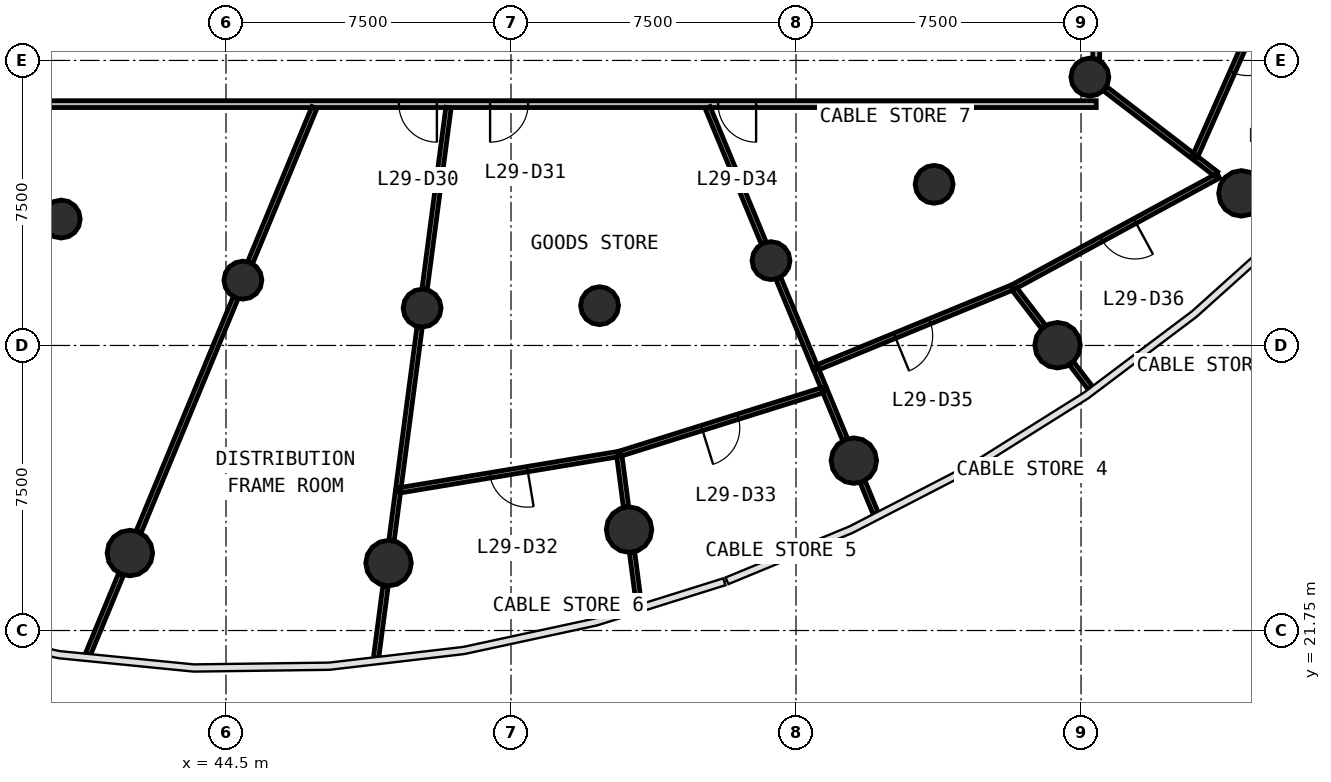
"""IFC4 building model, lengths in metres.
Left out: names, types, materials, properties, quantities, classifications, styles, units other than length and angle.
Written with IfcOpenShell. Run it as: python <this file> out.ifc"""

import sys

from ifc_helpers import new_model, si_unit, direction, frame, frame_2d, origin, origin_2d, place, context, subcontext, project, spatial, rectangle, circle, extrude, source, transform, mapped, element, fill, save


model = new_model("IFC4")
c1 = context("Model", 3, precision=1e-05, world=origin(), true_north=direction((0.0, 1.0)))
c2 = subcontext(c1, "Body", "Model", "MODEL_VIEW")
j1 = project(units=[si_unit("LENGTHUNIT", "METRE"), si_unit("PLANEANGLEUNIT", "RADIAN")], contexts=[c1])
p1 = place(None, origin())
s1 = spatial("IfcSite", under=j1, at=p1, CompositionType="ELEMENT")
p2 = place(p1, origin())
s2 = spatial("IfcBuilding", under=s1, at=p2, CompositionType="ELEMENT")
p3 = place(p2, frame((0.0, 0.0, 124.9)))
s3 = spatial("IfcBuildingStorey", under=s2, at=p3, CompositionType="ELEMENT", Elevation=124.9)
m1 = source(origin(), c2, "Body", "SweptSolid", [
    extrude(circle(Radius=0.6, at=origin_2d()), origin(), (0.0, 0.0, 1.0), 4.1),
])
for number, where, z_axis, x_axis in (
    (1, (41.971, 23.788, 0.0), (0.0, 0.0, 1.0), (1.0, 0.0, 0.0)),
    (2, (48.778, 23.523, 0.0), (0.0, 0.0, 1.0), (1.0, 0.0, 0.0)),
    (3, (55.106, 24.405, 0.0), (0.0, 0.0, 1.0), (1.0, 0.0, 0.0)),
    (4, (61.022, 26.219, 0.0), (0.0, 0.0, 1.0), (1.0, 0.0, 0.0)),
    (5, (66.382, 29.257, 0.0), (0.0, 0.0, 1.0), (1.0, 0.0, 0.0)),
    (6, (71.22, 33.252, 0.0), (0.0, 0.0, 1.0), (1.0, 0.0, 0.0)),
):
    element("IfcColumn", number, at=place(p3, frame(where, z_axis=z_axis, x_axis=x_axis)), inside=s3, PredefinedType="COLUMN", context=c2, shape_type="MappedRepresentation", body=[
        mapped(m1, transform((0.0, 0.0, 0.0), scale=1.0)),
    ])
m2 = source(origin(), c2, "Body", "SweptSolid", [
    extrude(circle(Radius=0.5, at=origin_2d()), origin(), (0.0, 0.0, 1.0), 4.1),
])
for number, where, z_axis, x_axis in (
    (7, (40.165, 32.576, 0.0), (0.0, 0.0, 1.0), (1.0, 0.0, 0.0)),
    (8, (44.945, 30.969, 0.0), (0.0, 0.0, 1.0), (1.0, 0.0, 0.0)),
    (9, (49.661, 30.233, 0.0), (0.0, 0.0, 1.0), (1.0, 0.0, 0.0)),
    (10, (54.331, 30.297, 0.0), (0.0, 0.0, 1.0), (1.0, 0.0, 0.0)),
    (11, (58.842, 31.482, 0.0), (0.0, 0.0, 1.0), (1.0, 0.0, 0.0)),
    (12, (63.134, 33.49, 0.0), (0.0, 0.0, 1.0), (1.0, 0.0, 0.0)),
    (13, (67.232, 36.312, 0.0), (0.0, 0.0, 1.0), (1.0, 0.0, 0.0)),
):
    element("IfcColumn", number, at=place(p3, frame(where, z_axis=z_axis, x_axis=x_axis)), inside=s3, PredefinedType="COLUMN", context=c2, shape_type="MappedRepresentation", body=[
        mapped(m2, transform((0.0, 0.0, 0.0), scale=1.0)),
    ])
p4 = place(p3, frame((67.4, 35.6, 0.0), z_axis=(0.0, 0.0, 1.0), x_axis=(-1.0, 0.0, 0.0)))
e14 = element("IfcWall", 14, at=p4, inside=s3, PredefinedType="PARTITIONING", context=c2, shape_type="SweptSolid", body=[
    extrude(rectangle(XDim=30.8, YDim=0.18, at=frame_2d((15.4, 0.0))), origin(), (0.0, 0.0, 1.0), 2.8),
])
p5 = place(p4, frame((17.35, 0.0, 0.0)))
e15 = element("IfcOpeningElement", 15, at=p5, cuts=e14, PredefinedType="OPENING", context=c2, shape_type="SweptSolid", body=[
    extrude(rectangle(XDim=1.0, YDim=2.1, at=frame_2d((0.5, 1.05))), frame((0.0, 0.1, 0.0), z_axis=(0.0, -1.0, 0.0), x_axis=(1.0, 0.0, 0.0)), (0.0, 0.0, 1.0), 0.2),
])
p6 = place(p4, frame((14.95, 0.0, 0.0)))
e16 = element("IfcOpeningElement", 16, at=p6, cuts=e14, PredefinedType="OPENING", context=c2, shape_type="SweptSolid", body=[
    extrude(rectangle(XDim=1.0, YDim=2.1, at=frame_2d((0.5, 1.05))), frame((0.0, 0.1, 0.0), z_axis=(0.0, -1.0, 0.0), x_axis=(1.0, 0.0, 0.0)), (0.0, 0.0, 1.0), 0.2),
])
p7 = place(p4, frame((8.95, 0.0, 0.0)))
e17 = element("IfcOpeningElement", 17, at=p7, cuts=e14, PredefinedType="OPENING", context=c2, shape_type="SweptSolid", body=[
    extrude(rectangle(XDim=1.0, YDim=2.1, at=frame_2d((0.5, 1.05))), frame((0.0, 0.1, 0.0), z_axis=(0.0, -1.0, 0.0), x_axis=(1.0, 0.0, 0.0)), (0.0, 0.0, 1.0), 0.2),
])
p8 = place(p3, frame((67.4, 60.37, 0.0), z_axis=(0.0, 0.0, 1.0), x_axis=(0.0, -1.0, 0.0)))
e18 = element("IfcWall", 18, at=p8, inside=s3, PredefinedType="PARTITIONING", context=c2, shape_type="SweptSolid", body=[
    extrude(rectangle(XDim=23.583, YDim=0.18, at=frame_2d((11.791, 0.0))), origin(), (0.0, 0.0, 1.0), 2.8),
])
p9 = place(p8, frame((11.333, 0.0, 0.0)))
e19 = element("IfcOpeningElement", 19, at=p9, cuts=e18, PredefinedType="OPENING", context=c2, shape_type="SweptSolid", body=[
    extrude(rectangle(XDim=1.0, YDim=2.1, at=frame_2d((0.5, 1.05))), frame((0.0, 0.1, 0.0), z_axis=(0.0, -1.0, 0.0), x_axis=(1.0, 0.0, 0.0)), (0.0, 0.0, 1.0), 0.2),
])
p10 = place(p8, frame((9.133, 0.0, 0.0)))
e20 = element("IfcOpeningElement", 20, at=p10, cuts=e18, PredefinedType="OPENING", context=c2, shape_type="SweptSolid", body=[
    extrude(rectangle(XDim=1.0, YDim=2.1, at=frame_2d((0.5, 1.05))), frame((0.0, 0.1, 0.0), z_axis=(0.0, -1.0, 0.0), x_axis=(1.0, 0.0, 0.0)), (0.0, 0.0, 1.0), 0.2),
])
p11 = place(p3, frame((44.752, 30.502, 0.0), z_axis=(0.0, 0.0, 1.0), x_axis=(-0.382696989205, -0.923873916968, 0.0)))
e21 = element("IfcWall", 21, at=p11, inside=s3, PredefinedType="PARTITIONING", context=c2, shape_type="SweptSolid", body=[
    extrude(rectangle(XDim=6.663, YDim=0.14, at=frame_2d((3.332, 0.0))), origin(), (0.0, 0.0, 1.0), 2.8),
])
p12 = place(p3, frame((70.614, 33.717, 0.0), z_axis=(0.0, 0.0, 1.0), x_axis=(-0.878930010096, -0.476950770365, 0.0)))
e22 = element("IfcWall", 22, at=p12, inside=s3, PredefinedType="PARTITIONING", context=c2, shape_type="SweptSolid", body=[
    extrude(rectangle(XDim=6.148, YDim=0.14, at=frame_2d((3.074, 0.0))), origin(), (0.0, 0.0, 1.0), 2.8),
])
p13 = place(p12, frame((2.498, 0.0, 0.0)))
e23 = element("IfcOpeningElement", 23, at=p13, cuts=e22, PredefinedType="OPENING", context=c2, shape_type="SweptSolid", body=[
    extrude(rectangle(XDim=1.0, YDim=2.1, at=frame_2d((0.5, 1.05))), frame((0.0, 0.08, 0.0), z_axis=(0.0, -1.0, 0.0), x_axis=(1.0, 0.0, 0.0)), (0.0, 0.0, 1.0), 0.16),
])
p14 = place(p3, frame((54.844, 26.396, 0.0), z_axis=(0.0, 0.0, 1.0), x_axis=(-0.986521231728, -0.16363330758, 0.0)))
e24 = element("IfcWall", 24, at=p14, inside=s3, PredefinedType="PARTITIONING", context=c2, shape_type="SweptSolid", body=[
    extrude(rectangle(XDim=5.895, YDim=0.14, at=frame_2d((2.947, 0.0))), origin(), (0.0, 0.0, 1.0), 2.8),
])
p15 = place(p14, frame((2.445, 0.0, 0.0)))
e25 = element("IfcOpeningElement", 25, at=p15, cuts=e24, PredefinedType="OPENING", context=c2, shape_type="SweptSolid", body=[
    extrude(rectangle(XDim=1.0, YDim=2.1, at=frame_2d((0.5, 1.05))), frame((0.0, 0.08, 0.0), z_axis=(0.0, -1.0, 0.0), x_axis=(1.0, 0.0, 0.0)), (0.0, 0.0, 1.0), 0.16),
])
p16 = place(p3, frame((72.365, 39.564, 0.0), z_axis=(0.0, 0.0, 1.0), x_axis=(-0.404918707425, -0.914352689271, 0.0)))
e26 = element("IfcWall", 26, at=p16, inside=s3, PredefinedType="PARTITIONING", context=c2, shape_type="SweptSolid", body=[
    extrude(rectangle(XDim=5.87, YDim=0.14, at=frame_2d((2.935, 0.0))), origin(), (0.0, 0.0, 1.0), 2.8),
])
p17 = place(p16, frame((2.42, 0.0, 0.0)))
e27 = element("IfcOpeningElement", 27, at=p17, cuts=e26, PredefinedType="OPENING", context=c2, shape_type="SweptSolid", body=[
    extrude(rectangle(XDim=1.0, YDim=2.1, at=frame_2d((0.5, 1.05))), frame((0.0, 0.08, 0.0), z_axis=(0.0, -1.0, 0.0), x_axis=(1.0, 0.0, 0.0)), (0.0, 0.0, 1.0), 0.16),
])
p18 = place(p3, frame((60.248, 28.089, 0.0), z_axis=(0.0, 0.0, 1.0), x_axis=(-0.954278452845, -0.298919110189, 0.0)))
e28 = element("IfcWall", 28, at=p18, inside=s3, PredefinedType="PARTITIONING", context=c2, shape_type="SweptSolid", body=[
    extrude(rectangle(XDim=5.632, YDim=0.14, at=frame_2d((2.816, 0.0))), origin(), (0.0, 0.0, 1.0), 2.8),
])
p19 = place(p18, frame((2.382, 0.0, 0.0)))
e29 = element("IfcOpeningElement", 29, at=p19, cuts=e28, PredefinedType="OPENING", context=c2, shape_type="SweptSolid", body=[
    extrude(rectangle(XDim=1.0, YDim=2.1, at=frame_2d((0.5, 1.05))), frame((0.0, 0.08, 0.0), z_axis=(0.0, -1.0, 0.0), x_axis=(1.0, 0.0, 0.0)), (0.0, 0.0, 1.0), 0.16),
])
p20 = place(p3, frame((65.182, 30.773, 0.0), z_axis=(0.0, 0.0, 1.0), x_axis=(-0.924926811929, -0.380145225637, 0.0)))
e30 = element("IfcWall", 30, at=p20, inside=s3, PredefinedType="PARTITIONING", context=c2, shape_type="SweptSolid", body=[
    extrude(rectangle(XDim=5.586, YDim=0.14, at=frame_2d((2.793, 0.0))), origin(), (0.0, 0.0, 1.0), 2.8),
])
p21 = place(p20, frame((2.336, 0.0, 0.0)))
e31 = element("IfcOpeningElement", 31, at=p21, cuts=e30, PredefinedType="OPENING", context=c2, shape_type="SweptSolid", body=[
    extrude(rectangle(XDim=1.0, YDim=2.1, at=frame_2d((0.5, 1.05))), frame((0.0, 0.08, 0.0), z_axis=(0.0, -1.0, 0.0), x_axis=(1.0, 0.0, 0.0)), (0.0, 0.0, 1.0), 0.16),
])
p22 = place(p3, frame((50.356, 35.51, 0.0), z_axis=(0.0, 0.0, 1.0), x_axis=(-0.130523979823, -0.991445152639, 0.0)))
e32 = element("IfcWall", 32, at=p22, inside=s3, PredefinedType="PARTITIONING", context=c2, shape_type="SweptSolid", body=[
    extrude(rectangle(XDim=4.818, YDim=0.14, at=frame_2d((2.409, 0.0))), origin(), (0.0, 0.0, 1.0), 2.8),
])
p23 = place(p3, frame((46.826, 35.51, 0.0), z_axis=(0.0, 0.0, 1.0), x_axis=(-0.382672831764, -0.923883923353, 0.0)))
e33 = element("IfcWall", 33, at=p23, inside=s3, PredefinedType="PARTITIONING", context=c2, shape_type="SweptSolid", body=[
    extrude(rectangle(XDim=4.41, YDim=0.14, at=frame_2d((2.205, 0.0))), origin(), (0.0, 0.0, 1.0), 2.8),
])
p24 = place(p3, frame((49.595, 29.733, 0.0), z_axis=(0.0, 0.0, 1.0), x_axis=(-0.130506335876, -0.991447475309, 0.0)))
e34 = element("IfcWall", 34, at=p24, inside=s3, PredefinedType="PARTITIONING", context=c2, shape_type="SweptSolid", body=[
    extrude(rectangle(XDim=4.265, YDim=0.14, at=frame_2d((2.133, 0.0))), origin(), (0.0, 0.0, 1.0), 2.8),
])
p25 = place(p3, frame((57.174, 35.51, 0.0), z_axis=(0.0, 0.0, 1.0), x_axis=(0.382644558062, -0.923895633817, 0.0)))
e35 = element("IfcWall", 35, at=p25, inside=s3, PredefinedType="PARTITIONING", context=c2, shape_type="SweptSolid", body=[
    extrude(rectangle(XDim=3.854, YDim=0.14, at=frame_2d((1.927, 0.0))), origin(), (0.0, 0.0, 1.0), 2.8),
])
p26 = place(p3, frame((67.633, 36.005, 0.0), z_axis=(0.0, 0.0, 1.0), x_axis=(0.793359481557, -0.608753425472, 0.0)))
e36 = element("IfcWall", 36, at=p26, inside=s3, PredefinedType="PARTITIONING", context=c2, shape_type="SweptSolid", body=[
    extrude(rectangle(XDim=2.898, YDim=0.14, at=frame_2d((1.449, 0.0))), origin(), (0.0, 0.0, 1.0), 2.8),
])
p27 = place(p3, frame((59.035, 31.016, 0.0), z_axis=(0.0, 0.0, 1.0), x_axis=(0.382772084801, -0.923842806487, 0.0)))
e37 = element("IfcWall", 37, at=p27, inside=s3, PredefinedType="PARTITIONING", context=c2, shape_type="SweptSolid", body=[
    extrude(rectangle(XDim=2.531, YDim=0.14, at=frame_2d((1.265, 0.0))), origin(), (0.0, 0.0, 1.0), 2.8),
])
p28 = place(p3, frame((41.74, 23.229, 0.0), z_axis=(0.0, 0.0, 1.0), x_axis=(-0.382697386614, -0.923873752348, 0.0)))
e38 = element("IfcWall", 38, at=p28, inside=s3, PredefinedType="PARTITIONING", context=c2, shape_type="SweptSolid", body=[
    extrude(rectangle(XDim=2.288, YDim=0.14, at=frame_2d((1.144, 0.0))), origin(), (0.0, 0.0, 1.0), 2.8),
])
p29 = place(p3, frame((48.699, 22.924, 0.0), z_axis=(0.0, 0.0, 1.0), x_axis=(-0.130527053476, -0.991444747987, 0.0)))
e39 = element("IfcWall", 39, at=p29, inside=s3, PredefinedType="PARTITIONING", context=c2, shape_type="SweptSolid", body=[
    extrude(rectangle(XDim=1.915, YDim=0.14, at=frame_2d((0.958, 0.0))), origin(), (0.0, 0.0, 1.0), 2.8),
])
p30 = place(p3, frame((60.259, 28.061, 0.0), z_axis=(0.0, 0.0, 1.0), x_axis=(0.382641697258, -0.923896818654, 0.0)))
e40 = element("IfcWall", 40, at=p30, inside=s3, PredefinedType="PARTITIONING", context=c2, shape_type="SweptSolid", body=[
    extrude(rectangle(XDim=1.388, YDim=0.14, at=frame_2d((0.694, 0.0))), origin(), (0.0, 0.0, 1.0), 2.8),
])
p31 = place(p3, frame((55.185, 23.805, 0.0), z_axis=(0.0, 0.0, 1.0), x_axis=(0.130575464365, -0.991438373327, 0.0)))
e41 = element("IfcWall", 41, at=p31, inside=s3, PredefinedType="PARTITIONING", context=c2, shape_type="SweptSolid", body=[
    extrude(rectangle(XDim=1.41, YDim=0.14, at=frame_2d((0.705, 0.0))), origin(), (0.0, 0.0, 1.0), 2.8),
])
p32 = place(p3, frame((54.854, 26.327, 0.0), z_axis=(0.0, 0.0, 1.0), x_axis=(0.130473447072, -0.991451803977, 0.0)))
e42 = element("IfcWall", 42, at=p32, inside=s3, PredefinedType="PARTITIONING", context=c2, shape_type="SweptSolid", body=[
    extrude(rectangle(XDim=1.334, YDim=0.14, at=frame_2d((0.667, 0.0))), origin(), (0.0, 0.0, 1.0), 2.8),
])
p33 = place(p3, frame((65.253, 30.729, 0.0), z_axis=(0.0, 0.0, 1.0), x_axis=(0.608927359571, -0.793225989719, 0.0)))
e43 = element("IfcWall", 43, at=p33, inside=s3, PredefinedType="PARTITIONING", context=c2, shape_type="SweptSolid", body=[
    extrude(rectangle(XDim=1.25, YDim=0.14, at=frame_2d((0.625, 0.0))), origin(), (0.0, 0.0, 1.0), 2.8),
])
p34 = place(p3, frame((49.025, 25.402, 0.0), z_axis=(0.0, 0.0, 1.0), x_axis=(-0.130552399509, -0.991441410766, 0.0)))
e44 = element("IfcWall", 44, at=p34, inside=s3, PredefinedType="PARTITIONING", context=c2, shape_type="SweptSolid", body=[
    extrude(rectangle(XDim=1.29, YDim=0.14, at=frame_2d((0.645, 0.0))), origin(), (0.0, 0.0, 1.0), 2.8),
])
p35 = place(p3, frame((61.253, 25.66, 0.0), z_axis=(0.0, 0.0, 1.0), x_axis=(0.382657128341, -0.923890427556, 0.0)))
e45 = element("IfcWall", 45, at=p35, inside=s3, PredefinedType="PARTITIONING", context=c2, shape_type="SweptSolid", body=[
    extrude(rectangle(XDim=0.895, YDim=0.14, at=frame_2d((0.447, 0.0))), origin(), (0.0, 0.0, 1.0), 2.8),
])
p36 = place(p3, frame((66.75, 28.778, 0.0), z_axis=(0.0, 0.0, 1.0), x_axis=(0.608680693656, -0.79341528418, 0.0)))
e46 = element("IfcWall", 46, at=p36, inside=s3, PredefinedType="PARTITIONING", context=c2, shape_type="SweptSolid", body=[
    extrude(rectangle(XDim=0.802, YDim=0.14, at=frame_2d((0.401, 0.0))), origin(), (0.0, 0.0, 1.0), 2.8),
])
p37 = place(p3, frame((70.012, 34.179, 0.0), z_axis=(0.0, 0.0, 1.0), x_axis=(0.79332944937, -0.608792562999, 0.0)))
e47 = element("IfcWall", 47, at=p37, inside=s3, PredefinedType="PARTITIONING", context=c2, shape_type="SweptSolid", body=[
    extrude(rectangle(XDim=0.681, YDim=0.14, at=frame_2d((0.341, 0.0))), origin(), (0.0, 0.0, 1.0), 2.8),
])
p38 = place(p3, frame((60.027, 28.622, 0.0), z_axis=(0.0, 0.0, 1.0), x_axis=(0.382734457734, -0.923858395461, 0.0)))
e48 = element("IfcWall", 48, at=p38, inside=s3, PredefinedType="PARTITIONING", context=c2, shape_type="SweptSolid", body=[
    extrude(rectangle(XDim=0.507, YDim=0.14, at=frame_2d((0.253, 0.0))), origin(), (0.0, 0.0, 1.0), 2.8),
])
m3 = source(origin(), c2, "Body", "SweptSolid", [
    extrude(rectangle(XDim=1.0, YDim=2.1, at=frame_2d((0.5, 1.05))), frame((0.0, 0.025, 0.0), z_axis=(0.0, -1.0, 0.0), x_axis=(1.0, 0.0, 0.0)), (0.0, 0.0, 1.0), 0.05),
])
p39 = place(p5, origin())
e49 = element("IfcDoor", 49, at=p39, inside=s3, OperationType="SINGLE_SWING_LEFT", PredefinedType="DOOR", context=c2, shape_type="MappedRepresentation", body=[
    mapped(m3, transform((0.0, 0.0, 0.0), scale=1.0)),
])
fill(e15, e49)
p40 = place(p6, origin())
e50 = element("IfcDoor", 50, at=p40, inside=s3, OperationType="SINGLE_SWING_RIGHT", PredefinedType="DOOR", context=c2, shape_type="MappedRepresentation", body=[
    mapped(m3, transform((0.0, 0.0, 0.0), scale=1.0)),
])
fill(e16, e50)
p41 = place(p15, origin())
e51 = element("IfcDoor", 51, at=p41, inside=s3, OperationType="SINGLE_SWING_LEFT", PredefinedType="DOOR", context=c2, shape_type="MappedRepresentation", body=[
    mapped(m3, transform((0.0, 0.0, 0.0), scale=1.0)),
])
fill(e25, e51)
p42 = place(p19, origin())
e52 = element("IfcDoor", 52, at=p42, inside=s3, OperationType="SINGLE_SWING_RIGHT", PredefinedType="DOOR", context=c2, shape_type="MappedRepresentation", body=[
    mapped(m3, transform((0.0, 0.0, 0.0), scale=1.0)),
])
fill(e29, e52)
p43 = place(p7, origin())
e53 = element("IfcDoor", 53, at=p43, inside=s3, OperationType="SINGLE_SWING_LEFT", PredefinedType="DOOR", context=c2, shape_type="MappedRepresentation", body=[
    mapped(m3, transform((0.0, 0.0, 0.0), scale=1.0)),
])
fill(e17, e53)
p44 = place(p21, origin())
e54 = element("IfcDoor", 54, at=p44, inside=s3, OperationType="SINGLE_SWING_RIGHT", PredefinedType="DOOR", context=c2, shape_type="MappedRepresentation", body=[
    mapped(m3, transform((0.0, 0.0, 0.0), scale=1.0)),
])
fill(e31, e54)
p45 = place(p13, origin())
e55 = element("IfcDoor", 55, at=p45, inside=s3, OperationType="SINGLE_SWING_LEFT", PredefinedType="DOOR", context=c2, shape_type="MappedRepresentation", body=[
    mapped(m3, transform((0.0, 0.0, 0.0), scale=1.0)),
])
fill(e23, e55)
p46 = place(p17, origin())
e56 = element("IfcDoor", 56, at=p46, inside=s3, OperationType="SINGLE_SWING_LEFT", PredefinedType="DOOR", context=c2, shape_type="MappedRepresentation", body=[
    mapped(m3, transform((0.0, 0.0, 0.0), scale=1.0)),
])
fill(e27, e56)
save(model, sys.argv[1])
